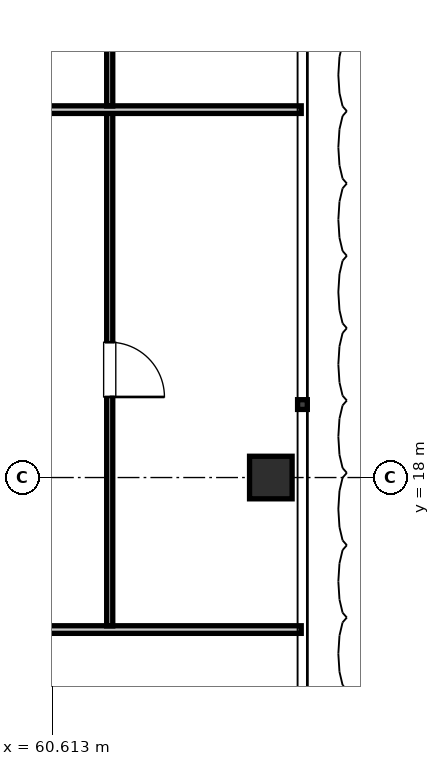
"""IFC4 building model, lengths in metres.
Left out: names, types, materials, properties, quantities, classifications, styles, units other than length and angle.
Written with IfcOpenShell. Run it as: python <this file> out.ifc"""

import sys

from ifc_helpers import new_model, si_unit, direction, frame, frame_2d, origin, origin_2d, place, context, subcontext, project, spatial, rectangle, i_section, extrude, element, fill, save


model = new_model("IFC4")
c1 = context("Model", 3, precision=1e-05, world=origin(), true_north=direction((0.0, 1.0)))
c2 = subcontext(c1, "Body", "Model", "MODEL_VIEW")
j1 = project(units=[si_unit("LENGTHUNIT", "METRE"), si_unit("PLANEANGLEUNIT", "RADIAN")], contexts=[c1])
p1 = place(None, origin())
s1 = spatial("IfcSite", under=j1, at=p1, CompositionType="ELEMENT")
p2 = place(p1, origin())
s2 = spatial("IfcBuilding", under=s1, at=p2, CompositionType="ELEMENT")
p3 = place(p2, frame((0.0, 0.0, 73.15)))
s3 = spatial("IfcBuildingStorey", under=s2, at=p3, CompositionType="ELEMENT", Elevation=73.15)
p4 = place(p3, frame((64.2, 18.0, 0.0), z_axis=(0.0, 0.0, 1.0), x_axis=(1.0, 0.0, 0.0)))
e1 = element("IfcColumn", 1, at=p4, inside=s3, PredefinedType="COLUMN", context=c2, shape_type="SweptSolid", body=[
    extrude(i_section(OverallWidth=0.7, OverallDepth=0.7, WebThickness=0.028, FlangeThickness=0.044, at=origin_2d()), origin(), (0.0, 0.0, 1.0), 3.85),
])
p5 = place(p3, frame((55.58, 15.5, 0.0), z_axis=(0.0, 0.0, 1.0), x_axis=(1.0, 0.0, 0.0)))
e2 = element("IfcWall", 2, at=p5, inside=s3, PredefinedType="PARTITIONING", context=c2, shape_type="SweptSolid", body=[
    extrude(rectangle(XDim=9.12, YDim=0.125, at=frame_2d((4.56, 0.0))), origin(), (0.0, 0.0, 1.0), 3.61),
])
p6 = place(p3, frame((61.55, 15.56, 0.0), z_axis=(0.0, 0.0, 1.0), x_axis=(0.0, 1.0, 0.0)))
e3 = element("IfcWall", 3, at=p6, inside=s3, PredefinedType="PARTITIONING", context=c2, shape_type="SweptSolid", body=[
    extrude(rectangle(XDim=8.43, YDim=0.1, at=frame_2d((4.215, 0.0))), origin(), (0.0, 0.0, 1.0), 3.207),
])
p7 = place(p6, frame((3.765, 0.0, 0.0)))
e4 = element("IfcOpeningElement", 4, at=p7, cuts=e3, PredefinedType="OPENING", context=c2, shape_type="SweptSolid", body=[
    extrude(rectangle(XDim=0.9, YDim=2.1, at=frame_2d((0.45, 1.05))), frame((0.0, 0.06, 0.0), z_axis=(0.0, -1.0, 0.0), x_axis=(1.0, 0.0, 0.0)), (0.0, 0.0, 1.0), 0.12),
])
p8 = place(p3, frame((55.58, 24.05, 0.0), z_axis=(0.0, 0.0, 1.0), x_axis=(1.0, 0.0, 0.0)))
e5 = element("IfcWall", 5, at=p8, inside=s3, PredefinedType="PARTITIONING", context=c2, shape_type="SweptSolid", body=[
    extrude(rectangle(XDim=9.12, YDim=0.125, at=frame_2d((4.56, 0.0))), origin(), (0.0, 0.0, 1.0), 3.61),
])
p9 = place(p3, frame((61.55, 24.11, 0.0), z_axis=(0.0, 0.0, 1.0), x_axis=(0.0, 1.0, 0.0)))
e6 = element("IfcWall", 6, at=p9, inside=s3, PredefinedType="PARTITIONING", context=c2, shape_type="SweptSolid", body=[
    extrude(rectangle(XDim=8.43, YDim=0.1, at=frame_2d((4.215, 0.0))), origin(), (0.0, 0.0, 1.0), 3.207),
])
p10 = place(p9, frame((3.765, 0.0, 0.0)))
e7 = element("IfcOpeningElement", 7, at=p10, cuts=e6, PredefinedType="OPENING", context=c2, shape_type="SweptSolid", body=[
    extrude(rectangle(XDim=0.9, YDim=2.1, at=frame_2d((0.45, 1.05))), frame((0.0, 0.06, 0.0), z_axis=(0.0, -1.0, 0.0), x_axis=(1.0, 0.0, 0.0)), (0.0, 0.0, 1.0), 0.12),
])
p11 = place(p7, frame((0.9, 0.0, 0.0), z_axis=(0.0, 0.0, 1.0), x_axis=(-1.0, 0.0, 0.0)))
e8 = element("IfcDoor", 8, at=p11, inside=s3, OperationType="SINGLE_SWING_RIGHT", PredefinedType="DOOR", context=c2, shape_type="SweptSolid", body=[
    extrude(rectangle(XDim=0.9, YDim=2.1, at=frame_2d((0.45, 1.05))), frame((0.0, 0.025, 0.0), z_axis=(0.0, -1.0, 0.0), x_axis=(1.0, 0.0, 0.0)), (0.0, 0.0, 1.0), 0.05),
])
fill(e4, e8)
save(model, sys.argv[1])
